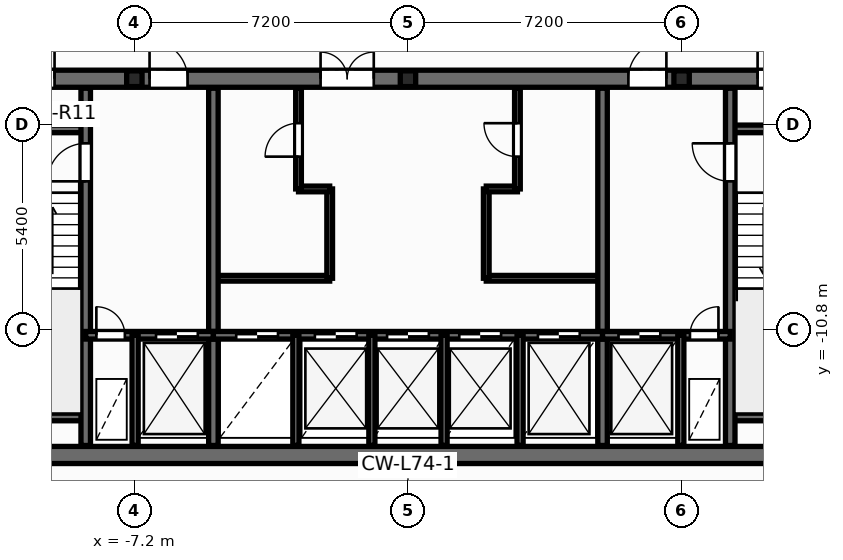
"""IFC4 building model, lengths in metres.
Left out: names, types, materials, properties, quantities, classifications, styles, units other than length and angle.
Written with IfcOpenShell. Run it as: python <this file> out.ifc"""

import sys

from ifc_helpers import new_model, si_unit, direction, frame, frame_2d, origin, origin_2d, place, context, subcontext, project, spatial, rectangle, i_section, extrude, element, fill, save


model = new_model("IFC4")
c1 = context("Model", 3, precision=1e-05, world=origin(), true_north=direction((0.0, 1.0)))
c2 = subcontext(c1, "Body", "Model", "MODEL_VIEW")
j1 = project(units=[si_unit("LENGTHUNIT", "METRE"), si_unit("PLANEANGLEUNIT", "RADIAN")], contexts=[c1])
p1 = place(None, origin())
s1 = spatial("IfcSite", under=j1, at=p1, CompositionType="ELEMENT")
p2 = place(p1, origin())
s2 = spatial("IfcBuilding", under=s1, at=p2, CompositionType="ELEMENT")
p3 = place(p2, frame((0.0, 0.0, 281.4)))
s3 = spatial("IfcBuildingStorey", under=s2, at=p3, CompositionType="ELEMENT", Elevation=281.4)
for number, where, z_axis, x_axis in (
    (1, (-7.2, -4.2, 0.0), (0.0, 0.0, 1.0), (1.0, 0.0, 0.0)),
    (2, (0.0, -4.2, 0.0), (0.0, 0.0, 1.0), (1.0, 0.0, 0.0)),
    (3, (7.2, -4.2, 0.0), (0.0, 0.0, 1.0), (1.0, 0.0, 0.0)),
):
    element("IfcColumn", number, at=place(p3, frame(where, z_axis=z_axis, x_axis=x_axis)), inside=s3, PredefinedType="PILASTER", context=c2, shape_type="SweptSolid", body=[
        extrude(i_section(OverallWidth=0.405, OverallDepth=0.414, WebThickness=0.022, FlangeThickness=0.032, at=origin_2d()), origin(), (0.0, 0.0, 1.0), 3.6),
    ])
p4 = place(p3, frame((-5.12, -9.45, 0.0), z_axis=(0.0, 0.0, 1.0), x_axis=(1.0, 0.0, 0.0)))
e4 = element("IfcWall", 4, at=p4, inside=s3, PredefinedType="PARTITIONING", context=c2, shape_type="SweptSolid", body=[
    extrude(rectangle(XDim=3.06, YDim=0.15, at=frame_2d((1.53, 0.0))), origin(), (0.0, 0.0, 1.0), 3.32),
])
p5 = place(p3, frame((-2.06, -9.45, 0.0), z_axis=(0.0, 0.0, 1.0), x_axis=(0.0, 1.0, 0.0)))
e5 = element("IfcWall", 5, at=p5, inside=s3, PredefinedType="PARTITIONING", context=c2, shape_type="SweptSolid", body=[
    extrude(rectangle(XDim=2.35, YDim=0.15, at=frame_2d((1.175, 0.0))), origin(), (0.0, 0.0, 1.0), 3.32),
])
p6 = place(p3, frame((-2.88, -7.1, 0.0), z_axis=(0.0, 0.0, 1.0), x_axis=(1.0, 0.0, 0.0)))
e6 = element("IfcWall", 6, at=p6, inside=s3, PredefinedType="PARTITIONING", context=c2, shape_type="SweptSolid", body=[
    extrude(rectangle(XDim=0.82, YDim=0.15, at=frame_2d((0.41, 0.0))), origin(), (0.0, 0.0, 1.0), 3.32),
])
p7 = place(p3, frame((-2.88, -7.1, 0.0), z_axis=(0.0, 0.0, 1.0), x_axis=(0.0, 1.0, 0.0)))
e7 = element("IfcWall", 7, at=p7, inside=s3, PredefinedType="PARTITIONING", context=c2, shape_type="SweptSolid", body=[
    extrude(rectangle(XDim=2.65, YDim=0.15, at=frame_2d((1.325, 0.0))), origin(), (0.0, 0.0, 1.0), 3.32),
])
p8 = place(p7, frame((0.85, 0.0, 0.0)))
e8 = element("IfcOpeningElement", 8, at=p8, cuts=e7, PredefinedType="OPENING", context=c2, shape_type="SweptSolid", body=[
    extrude(rectangle(XDim=0.886, YDim=2.104, at=frame_2d((0.44, 1.052))), frame((0.0, 0.085, 0.0), z_axis=(0.0, -1.0, 0.0), x_axis=(1.0, 0.0, 0.0)), (0.0, 0.0, 1.0), 0.17),
])
p9 = place(p3, frame((2.06, -9.45, 0.0), z_axis=(0.0, 0.0, 1.0), x_axis=(1.0, 0.0, 0.0)))
e9 = element("IfcWall", 9, at=p9, inside=s3, PredefinedType="PARTITIONING", context=c2, shape_type="SweptSolid", body=[
    extrude(rectangle(XDim=3.06, YDim=0.15, at=frame_2d((1.53, 0.0))), origin(), (0.0, 0.0, 1.0), 3.32),
])
p10 = place(p3, frame((2.06, -9.45, 0.0), z_axis=(0.0, 0.0, 1.0), x_axis=(0.0, 1.0, 0.0)))
e10 = element("IfcWall", 10, at=p10, inside=s3, PredefinedType="PARTITIONING", context=c2, shape_type="SweptSolid", body=[
    extrude(rectangle(XDim=2.35, YDim=0.15, at=frame_2d((1.175, 0.0))), origin(), (0.0, 0.0, 1.0), 3.32),
])
p11 = place(p3, frame((2.06, -7.1, 0.0), z_axis=(0.0, 0.0, 1.0), x_axis=(1.0, 0.0, 0.0)))
e11 = element("IfcWall", 11, at=p11, inside=s3, PredefinedType="PARTITIONING", context=c2, shape_type="SweptSolid", body=[
    extrude(rectangle(XDim=0.82, YDim=0.15, at=frame_2d((0.41, 0.0))), origin(), (0.0, 0.0, 1.0), 3.32),
])
p12 = place(p3, frame((2.88, -7.1, 0.0), z_axis=(0.0, 0.0, 1.0), x_axis=(0.0, 1.0, 0.0)))
e12 = element("IfcWall", 12, at=p12, inside=s3, PredefinedType="PARTITIONING", context=c2, shape_type="SweptSolid", body=[
    extrude(rectangle(XDim=2.65, YDim=0.15, at=frame_2d((1.325, 0.0))), origin(), (0.0, 0.0, 1.0), 3.32),
])
p13 = place(p12, frame((0.85, 0.0, 0.0)))
e13 = element("IfcOpeningElement", 13, at=p13, cuts=e12, PredefinedType="OPENING", context=c2, shape_type="SweptSolid", body=[
    extrude(rectangle(XDim=0.886, YDim=2.104, at=frame_2d((0.44, 1.052))), frame((0.0, 0.085, 0.0), z_axis=(0.0, -1.0, 0.0), x_axis=(1.0, 0.0, 0.0)), (0.0, 0.0, 1.0), 0.17),
])
p14 = place(p3, frame((-12.65, -14.1, 0.0), z_axis=(0.0, 0.0, 1.0), x_axis=(1.0, 0.0, 0.0)))
e14 = element("IfcWall", 14, at=p14, inside=s3, PredefinedType="SHEAR", context=c2, shape_type="SweptSolid", body=[
    extrude(rectangle(XDim=25.3, YDim=0.45, at=frame_2d((12.65, 0.0))), origin(), (0.0, 0.0, 1.0), 3.6),
])
p15 = place(p3, frame((-12.65, -4.2, 0.0), z_axis=(0.0, 0.0, 1.0), x_axis=(1.0, 0.0, 0.0)))
e15 = element("IfcWall", 15, at=p15, inside=s3, PredefinedType="SHEAR", context=c2, shape_type="SweptSolid", body=[
    extrude(rectangle(XDim=25.3, YDim=0.45, at=frame_2d((12.65, 0.0))), origin(), (0.0, 0.0, 1.0), 3.6),
])
p16 = place(p15, frame((0.95, 0.0, 0.0)))
e16 = element("IfcOpeningElement", 16, at=p16, cuts=e15, PredefinedType="OPENING", context=c2, shape_type="SweptSolid", body=[
    extrude(rectangle(XDim=0.756, YDim=2.054, at=frame_2d((0.375, 1.027))), frame((0.0, 0.235, 0.0), z_axis=(0.0, -1.0, 0.0), x_axis=(1.0, 0.0, 0.0)), (0.0, 0.0, 1.0), 0.47),
])
p17 = place(p15, frame((2.6, 0.0, 0.0)))
e17 = element("IfcOpeningElement", 17, at=p17, cuts=e15, PredefinedType="OPENING", context=c2, shape_type="SweptSolid", body=[
    extrude(rectangle(XDim=0.756, YDim=2.054, at=frame_2d((0.375, 1.027))), frame((0.0, 0.235, 0.0), z_axis=(0.0, -1.0, 0.0), x_axis=(1.0, 0.0, 0.0)), (0.0, 0.0, 1.0), 0.47),
])
p18 = place(p15, frame((21.85, 0.0, 0.0)))
e18 = element("IfcOpeningElement", 18, at=p18, cuts=e15, PredefinedType="OPENING", context=c2, shape_type="SweptSolid", body=[
    extrude(rectangle(XDim=0.756, YDim=2.054, at=frame_2d((0.375, 1.027))), frame((0.0, 0.235, 0.0), z_axis=(0.0, -1.0, 0.0), x_axis=(1.0, 0.0, 0.0)), (0.0, 0.0, 1.0), 0.47),
])
p19 = place(p15, frame((23.5, 0.0, 0.0)))
e19 = element("IfcOpeningElement", 19, at=p19, cuts=e15, PredefinedType="OPENING", context=c2, shape_type="SweptSolid", body=[
    extrude(rectangle(XDim=0.756, YDim=2.054, at=frame_2d((0.375, 1.027))), frame((0.0, 0.235, 0.0), z_axis=(0.0, -1.0, 0.0), x_axis=(1.0, 0.0, 0.0)), (0.0, 0.0, 1.0), 0.47),
])
p20 = place(p15, frame((5.85, 0.0, 0.0)))
e20 = element("IfcOpeningElement", 20, at=p20, cuts=e15, PredefinedType="OPENING", context=c2, shape_type="SweptSolid", body=[
    extrude(rectangle(XDim=1.006, YDim=2.104, at=frame_2d((0.5, 1.052))), frame((0.0, 0.235, 0.0), z_axis=(0.0, -1.0, 0.0), x_axis=(1.0, 0.0, 0.0)), (0.0, 0.0, 1.0), 0.47),
])
p21 = place(p15, frame((10.35, 0.0, 0.0)))
e21 = element("IfcOpeningElement", 21, at=p21, cuts=e15, PredefinedType="OPENING", context=c2, shape_type="SweptSolid", body=[
    extrude(rectangle(XDim=1.406, YDim=2.154, at=frame_2d((0.7, 1.077))), frame((0.0, 0.235, 0.0), z_axis=(0.0, -1.0, 0.0), x_axis=(1.0, 0.0, 0.0)), (0.0, 0.0, 1.0), 0.47),
])
p22 = place(p15, frame((18.45, 0.0, 0.0)))
e22 = element("IfcOpeningElement", 22, at=p22, cuts=e15, PredefinedType="OPENING", context=c2, shape_type="SweptSolid", body=[
    extrude(rectangle(XDim=1.006, YDim=2.104, at=frame_2d((0.5, 1.052))), frame((0.0, 0.235, 0.0), z_axis=(0.0, -1.0, 0.0), x_axis=(1.0, 0.0, 0.0)), (0.0, 0.0, 1.0), 0.47),
])
for number, where, z_axis, x_axis in (
    (23, (-12.35, -5.52, 0.0), (0.0, 0.0, 1.0), (1.0, 0.0, 0.0)),
    (24, (-12.35, -13.1, 0.0), (0.0, 0.0, 1.0), (1.0, 0.0, 0.0)),
    (25, (8.48, -5.52, 0.0), (0.0, 0.0, 1.0), (1.0, 0.0, 0.0)),
    (26, (8.48, -13.1, 0.0), (0.0, 0.0, 1.0), (1.0, 0.0, 0.0)),
):
    element("IfcWall", number, at=place(p3, frame(where, z_axis=z_axis, x_axis=x_axis)), inside=s3, PredefinedType="SOLIDWALL", context=c2, shape_type="SweptSolid", body=[
        extrude(rectangle(XDim=3.87, YDim=0.2, at=frame_2d((1.935, 0.0))), origin(), (0.0, 0.0, 1.0), 3.6),
    ])
p23 = place(p3, frame((-8.48, -13.85, 0.0), z_axis=(0.0, 0.0, 1.0), x_axis=(0.0, 1.0, 0.0)))
e27 = element("IfcWall", 27, at=p23, inside=s3, PredefinedType="SHEAR", context=c2, shape_type="SweptSolid", body=[
    extrude(rectangle(XDim=9.4, YDim=0.25, at=frame_2d((4.7, 0.0))), origin(), (0.0, 0.0, 1.0), 3.6),
])
p24 = place(p23, frame((6.95, 0.0, 0.0)))
e28 = element("IfcOpeningElement", 28, at=p24, cuts=e27, PredefinedType="OPENING", context=c2, shape_type="SweptSolid", body=[
    extrude(rectangle(XDim=1.006, YDim=2.104, at=frame_2d((0.5, 1.052))), frame((0.0, 0.135, 0.0), z_axis=(0.0, -1.0, 0.0), x_axis=(1.0, 0.0, 0.0)), (0.0, 0.0, 1.0), 0.27),
])
p25 = place(p3, frame((8.48, -13.85, 0.0), z_axis=(0.0, 0.0, 1.0), x_axis=(0.0, 1.0, 0.0)))
e29 = element("IfcWall", 29, at=p25, inside=s3, PredefinedType="SHEAR", context=c2, shape_type="SweptSolid", body=[
    extrude(rectangle(XDim=9.4, YDim=0.25, at=frame_2d((4.7, 0.0))), origin(), (0.0, 0.0, 1.0), 3.6),
])
p26 = place(p25, frame((6.95, 0.0, 0.0)))
e30 = element("IfcOpeningElement", 30, at=p26, cuts=e29, PredefinedType="OPENING", context=c2, shape_type="SweptSolid", body=[
    extrude(rectangle(XDim=1.006, YDim=2.104, at=frame_2d((0.5, 1.052))), frame((0.0, 0.135, 0.0), z_axis=(0.0, -1.0, 0.0), x_axis=(1.0, 0.0, 0.0)), (0.0, 0.0, 1.0), 0.27),
])
for number, where, z_axis, x_axis in (
    (31, (-5.12, -13.85, 0.0), (0.0, 0.0, 1.0), (0.0, 1.0, 0.0)),
    (32, (5.12, -13.85, 0.0), (0.0, 0.0, 1.0), (0.0, 1.0, 0.0)),
):
    element("IfcWall", number, at=place(p3, frame(where, z_axis=z_axis, x_axis=x_axis)), inside=s3, PredefinedType="SHEAR", context=c2, shape_type="SweptSolid", body=[
        extrude(rectangle(XDim=9.4, YDim=0.25, at=frame_2d((4.7, 0.0))), origin(), (0.0, 0.0, 1.0), 3.6),
    ])
p27 = place(p3, frame((-8.48, -10.95, 0.0), z_axis=(0.0, 0.0, 1.0), x_axis=(1.0, 0.0, 0.0)))
e33 = element("IfcWall", 33, at=p27, inside=s3, PredefinedType="SOLIDWALL", context=c2, shape_type="SweptSolid", body=[
    extrude(rectangle(XDim=3.36, YDim=0.2, at=frame_2d((1.68, 0.0))), origin(), (0.0, 0.0, 1.0), 3.6),
])
p28 = place(p27, frame((0.28, 0.0, 0.0)))
e34 = element("IfcOpeningElement", 34, at=p28, cuts=e33, PredefinedType="OPENING", context=c2, shape_type="SweptSolid", body=[
    extrude(rectangle(XDim=0.756, YDim=2.054, at=frame_2d((0.375, 1.027))), frame((0.0, 0.11, 0.0), z_axis=(0.0, -1.0, 0.0), x_axis=(1.0, 0.0, 0.0)), (0.0, 0.0, 1.0), 0.22),
])
p29 = place(p27, frame((1.85, 0.0, 0.0)))
e35 = element("IfcOpeningElement", 35, at=p29, cuts=e33, PredefinedType="OPENING", context=c2, shape_type="SweptSolid", body=[
    extrude(rectangle(XDim=1.106, YDim=2.104, at=frame_2d((0.55, 1.052))), frame((0.0, 0.11, 0.0), z_axis=(0.0, -1.0, 0.0), x_axis=(1.0, 0.0, 0.0)), (0.0, 0.0, 1.0), 0.22),
])
p30 = place(p3, frame((-5.12, -10.95, 0.0), z_axis=(0.0, 0.0, 1.0), x_axis=(1.0, 0.0, 0.0)))
e36 = element("IfcWall", 36, at=p30, inside=s3, PredefinedType="SOLIDWALL", context=c2, shape_type="SweptSolid", body=[
    extrude(rectangle(XDim=10.24, YDim=0.2, at=frame_2d((5.12, 0.0))), origin(), (0.0, 0.0, 1.0), 3.6),
])
p31 = place(p30, frame((0.6, 0.0, 0.0)))
e37 = element("IfcOpeningElement", 37, at=p31, cuts=e36, PredefinedType="OPENING", context=c2, shape_type="SweptSolid", body=[
    extrude(rectangle(XDim=1.106, YDim=2.104, at=frame_2d((0.55, 1.052))), frame((0.0, 0.11, 0.0), z_axis=(0.0, -1.0, 0.0), x_axis=(1.0, 0.0, 0.0)), (0.0, 0.0, 1.0), 0.22),
])
p32 = place(p30, frame((2.67, 0.0, 0.0)))
e38 = element("IfcOpeningElement", 38, at=p32, cuts=e36, PredefinedType="OPENING", context=c2, shape_type="SweptSolid", body=[
    extrude(rectangle(XDim=1.106, YDim=2.104, at=frame_2d((0.55, 1.052))), frame((0.0, 0.11, 0.0), z_axis=(0.0, -1.0, 0.0), x_axis=(1.0, 0.0, 0.0)), (0.0, 0.0, 1.0), 0.22),
])
p33 = place(p30, frame((4.57, 0.0, 0.0)))
e39 = element("IfcOpeningElement", 39, at=p33, cuts=e36, PredefinedType="OPENING", context=c2, shape_type="SweptSolid", body=[
    extrude(rectangle(XDim=1.106, YDim=2.104, at=frame_2d((0.55, 1.052))), frame((0.0, 0.11, 0.0), z_axis=(0.0, -1.0, 0.0), x_axis=(1.0, 0.0, 0.0)), (0.0, 0.0, 1.0), 0.22),
])
p34 = place(p30, frame((6.47, 0.0, 0.0)))
e40 = element("IfcOpeningElement", 40, at=p34, cuts=e36, PredefinedType="OPENING", context=c2, shape_type="SweptSolid", body=[
    extrude(rectangle(XDim=1.106, YDim=2.104, at=frame_2d((0.55, 1.052))), frame((0.0, 0.11, 0.0), z_axis=(0.0, -1.0, 0.0), x_axis=(1.0, 0.0, 0.0)), (0.0, 0.0, 1.0), 0.22),
])
p35 = place(p30, frame((8.54, 0.0, 0.0)))
e41 = element("IfcOpeningElement", 41, at=p35, cuts=e36, PredefinedType="OPENING", context=c2, shape_type="SweptSolid", body=[
    extrude(rectangle(XDim=1.106, YDim=2.104, at=frame_2d((0.55, 1.052))), frame((0.0, 0.11, 0.0), z_axis=(0.0, -1.0, 0.0), x_axis=(1.0, 0.0, 0.0)), (0.0, 0.0, 1.0), 0.22),
])
p36 = place(p3, frame((5.12, -10.95, 0.0), z_axis=(0.0, 0.0, 1.0), x_axis=(1.0, 0.0, 0.0)))
e42 = element("IfcWall", 42, at=p36, inside=s3, PredefinedType="SOLIDWALL", context=c2, shape_type="SweptSolid", body=[
    extrude(rectangle(XDim=3.36, YDim=0.2, at=frame_2d((1.68, 0.0))), origin(), (0.0, 0.0, 1.0), 3.6),
])
p37 = place(p36, frame((0.42, 0.0, 0.0)))
e43 = element("IfcOpeningElement", 43, at=p37, cuts=e42, PredefinedType="OPENING", context=c2, shape_type="SweptSolid", body=[
    extrude(rectangle(XDim=1.106, YDim=2.104, at=frame_2d((0.55, 1.052))), frame((0.0, 0.11, 0.0), z_axis=(0.0, -1.0, 0.0), x_axis=(1.0, 0.0, 0.0)), (0.0, 0.0, 1.0), 0.22),
])
p38 = place(p36, frame((2.3, 0.0, 0.0)))
e44 = element("IfcOpeningElement", 44, at=p38, cuts=e42, PredefinedType="OPENING", context=c2, shape_type="SweptSolid", body=[
    extrude(rectangle(XDim=0.756, YDim=2.054, at=frame_2d((0.375, 1.027))), frame((0.0, 0.11, 0.0), z_axis=(0.0, -1.0, 0.0), x_axis=(1.0, 0.0, 0.0)), (0.0, 0.0, 1.0), 0.22),
])
for number, where, z_axis, x_axis in (
    (45, (-7.18, -13.85, 0.0), (0.0, 0.0, 1.0), (0.0, 1.0, 0.0)),
    (46, (7.18, -13.85, 0.0), (0.0, 0.0, 1.0), (0.0, 1.0, 0.0)),
    (47, (-2.95, -13.85, 0.0), (0.0, 0.0, 1.0), (0.0, 1.0, 0.0)),
    (48, (2.95, -13.85, 0.0), (0.0, 0.0, 1.0), (0.0, 1.0, 0.0)),
    (49, (-0.95, -13.85, 0.0), (0.0, 0.0, 1.0), (0.0, 1.0, 0.0)),
    (50, (0.95, -13.85, 0.0), (0.0, 0.0, 1.0), (0.0, 1.0, 0.0)),
):
    element("IfcWall", number, at=place(p3, frame(where, z_axis=z_axis, x_axis=x_axis)), inside=s3, PredefinedType="PARTITIONING", context=c2, shape_type="SweptSolid", body=[
        extrude(rectangle(XDim=2.9, YDim=0.16, at=frame_2d((1.45, 0.0))), origin(), (0.0, 0.0, 1.0), 2.545),
    ])
p39 = place(p8, origin())
e51 = element("IfcDoor", 51, at=p39, inside=s3, OperationType="SINGLE_SWING_LEFT", PredefinedType="DOOR", context=c2, shape_type="SweptSolid", body=[
    extrude(rectangle(XDim=0.88, YDim=2.1, at=frame_2d((0.44, 1.05))), frame((0.0, 0.025, 0.0), z_axis=(0.0, -1.0, 0.0), x_axis=(1.0, 0.0, 0.0)), (0.0, 0.0, 1.0), 0.05),
])
fill(e8, e51)
p40 = place(p13, origin())
e52 = element("IfcDoor", 52, at=p40, inside=s3, OperationType="SINGLE_SWING_RIGHT", PredefinedType="DOOR", context=c2, shape_type="SweptSolid", body=[
    extrude(rectangle(XDim=0.88, YDim=2.1, at=frame_2d((0.44, 1.05))), frame((0.0, 0.025, 0.0), z_axis=(0.0, -1.0, 0.0), x_axis=(1.0, 0.0, 0.0)), (0.0, 0.0, 1.0), 0.05),
])
fill(e13, e52)
p41 = place(p24, origin())
e53 = element("IfcDoor", 53, at=p41, inside=s3, OperationType="SINGLE_SWING_LEFT", PredefinedType="DOOR", context=c2, shape_type="SweptSolid", body=[
    extrude(rectangle(XDim=1.0, YDim=2.1, at=frame_2d((0.5, 1.05))), frame((0.0, 0.025, 0.0), z_axis=(0.0, -1.0, 0.0), x_axis=(1.0, 0.0, 0.0)), (0.0, 0.0, 1.0), 0.05),
])
fill(e28, e53)
p42 = place(p26, origin())
e54 = element("IfcDoor", 54, at=p42, inside=s3, OperationType="SINGLE_SWING_RIGHT", PredefinedType="DOOR", context=c2, shape_type="SweptSolid", body=[
    extrude(rectangle(XDim=1.0, YDim=2.1, at=frame_2d((0.5, 1.05))), frame((0.0, 0.025, 0.0), z_axis=(0.0, -1.0, 0.0), x_axis=(1.0, 0.0, 0.0)), (0.0, 0.0, 1.0), 0.05),
])
fill(e30, e54)
p43 = place(p28, origin())
e55 = element("IfcDoor", 55, at=p43, inside=s3, OperationType="SINGLE_SWING_LEFT", PredefinedType="DOOR", context=c2, shape_type="SweptSolid", body=[
    extrude(rectangle(XDim=0.75, YDim=2.05, at=frame_2d((0.375, 1.025))), frame((0.0, 0.025, 0.0), z_axis=(0.0, -1.0, 0.0), x_axis=(1.0, 0.0, 0.0)), (0.0, 0.0, 1.0), 0.05),
])
fill(e34, e55)
p44 = place(p29, origin())
e56 = element("IfcDoor", 56, at=p44, inside=s3, OperationType="DOUBLE_DOOR_SLIDING", PredefinedType="DOOR", context=c2, shape_type="SweptSolid", body=[
    extrude(rectangle(XDim=1.1, YDim=2.1, at=frame_2d((0.55, 1.05))), frame((0.0, 0.025, 0.0), z_axis=(0.0, -1.0, 0.0), x_axis=(1.0, 0.0, 0.0)), (0.0, 0.0, 1.0), 0.05),
])
fill(e35, e56)
p45 = place(p37, origin())
e57 = element("IfcDoor", 57, at=p45, inside=s3, OperationType="DOUBLE_DOOR_SLIDING", PredefinedType="DOOR", context=c2, shape_type="SweptSolid", body=[
    extrude(rectangle(XDim=1.1, YDim=2.1, at=frame_2d((0.55, 1.05))), frame((0.0, 0.025, 0.0), z_axis=(0.0, -1.0, 0.0), x_axis=(1.0, 0.0, 0.0)), (0.0, 0.0, 1.0), 0.05),
])
fill(e43, e57)
p46 = place(p38, origin())
e58 = element("IfcDoor", 58, at=p46, inside=s3, OperationType="SINGLE_SWING_RIGHT", PredefinedType="DOOR", context=c2, shape_type="SweptSolid", body=[
    extrude(rectangle(XDim=0.75, YDim=2.05, at=frame_2d((0.375, 1.025))), frame((0.0, 0.025, 0.0), z_axis=(0.0, -1.0, 0.0), x_axis=(1.0, 0.0, 0.0)), (0.0, 0.0, 1.0), 0.05),
])
fill(e44, e58)
p47 = place(p31, origin())
e59 = element("IfcDoor", 59, at=p47, inside=s3, OperationType="DOUBLE_DOOR_SLIDING", PredefinedType="DOOR", context=c2, shape_type="SweptSolid", body=[
    extrude(rectangle(XDim=1.1, YDim=2.1, at=frame_2d((0.55, 1.05))), frame((0.0, 0.025, 0.0), z_axis=(0.0, -1.0, 0.0), x_axis=(1.0, 0.0, 0.0)), (0.0, 0.0, 1.0), 0.05),
])
fill(e37, e59)
p48 = place(p32, origin())
e60 = element("IfcDoor", 60, at=p48, inside=s3, OperationType="DOUBLE_DOOR_SLIDING", PredefinedType="DOOR", context=c2, shape_type="SweptSolid", body=[
    extrude(rectangle(XDim=1.1, YDim=2.1, at=frame_2d((0.55, 1.05))), frame((0.0, 0.025, 0.0), z_axis=(0.0, -1.0, 0.0), x_axis=(1.0, 0.0, 0.0)), (0.0, 0.0, 1.0), 0.05),
])
fill(e38, e60)
p49 = place(p33, origin())
e61 = element("IfcDoor", 61, at=p49, inside=s3, OperationType="DOUBLE_DOOR_SLIDING", PredefinedType="DOOR", context=c2, shape_type="SweptSolid", body=[
    extrude(rectangle(XDim=1.1, YDim=2.1, at=frame_2d((0.55, 1.05))), frame((0.0, 0.025, 0.0), z_axis=(0.0, -1.0, 0.0), x_axis=(1.0, 0.0, 0.0)), (0.0, 0.0, 1.0), 0.05),
])
fill(e39, e61)
p50 = place(p34, origin())
e62 = element("IfcDoor", 62, at=p50, inside=s3, OperationType="DOUBLE_DOOR_SLIDING", PredefinedType="DOOR", context=c2, shape_type="SweptSolid", body=[
    extrude(rectangle(XDim=1.1, YDim=2.1, at=frame_2d((0.55, 1.05))), frame((0.0, 0.025, 0.0), z_axis=(0.0, -1.0, 0.0), x_axis=(1.0, 0.0, 0.0)), (0.0, 0.0, 1.0), 0.05),
])
fill(e40, e62)
p51 = place(p35, origin())
e63 = element("IfcDoor", 63, at=p51, inside=s3, OperationType="DOUBLE_DOOR_SLIDING", PredefinedType="DOOR", context=c2, shape_type="SweptSolid", body=[
    extrude(rectangle(XDim=1.1, YDim=2.1, at=frame_2d((0.55, 1.05))), frame((0.0, 0.025, 0.0), z_axis=(0.0, -1.0, 0.0), x_axis=(1.0, 0.0, 0.0)), (0.0, 0.0, 1.0), 0.05),
])
fill(e41, e63)
p52 = place(p17, origin())
e64 = element("IfcDoor", 64, at=p52, inside=s3, OperationType="SINGLE_SWING_RIGHT", PredefinedType="DOOR", context=c2, shape_type="SweptSolid", body=[
    extrude(rectangle(XDim=0.75, YDim=2.05, at=frame_2d((0.375, 1.025))), frame((0.0, 0.025, 0.0), z_axis=(0.0, -1.0, 0.0), x_axis=(1.0, 0.0, 0.0)), (0.0, 0.0, 1.0), 0.05),
])
fill(e17, e64)
p53 = place(p18, origin())
e65 = element("IfcDoor", 65, at=p53, inside=s3, OperationType="SINGLE_SWING_LEFT", PredefinedType="DOOR", context=c2, shape_type="SweptSolid", body=[
    extrude(rectangle(XDim=0.75, YDim=2.05, at=frame_2d((0.375, 1.025))), frame((0.0, 0.025, 0.0), z_axis=(0.0, -1.0, 0.0), x_axis=(1.0, 0.0, 0.0)), (0.0, 0.0, 1.0), 0.05),
])
fill(e18, e65)
p54 = place(p20, origin())
e66 = element("IfcDoor", 66, at=p54, inside=s3, OperationType="SINGLE_SWING_LEFT", PredefinedType="DOOR", context=c2, shape_type="SweptSolid", body=[
    extrude(rectangle(XDim=1.0, YDim=2.1, at=frame_2d((0.5, 1.05))), frame((0.0, 0.025, 0.0), z_axis=(0.0, -1.0, 0.0), x_axis=(1.0, 0.0, 0.0)), (0.0, 0.0, 1.0), 0.05),
])
fill(e20, e66)
p55 = place(p21, origin())
e67 = element("IfcDoor", 67, at=p55, inside=s3, OperationType="DOUBLE_DOOR_SINGLE_SWING", PredefinedType="DOOR", context=c2, shape_type="SweptSolid", body=[
    extrude(rectangle(XDim=1.4, YDim=2.15, at=frame_2d((0.7, 1.075))), frame((0.0, 0.025, 0.0), z_axis=(0.0, -1.0, 0.0), x_axis=(1.0, 0.0, 0.0)), (0.0, 0.0, 1.0), 0.05),
])
fill(e21, e67)
p56 = place(p22, origin())
e68 = element("IfcDoor", 68, at=p56, inside=s3, OperationType="SINGLE_SWING_RIGHT", PredefinedType="DOOR", context=c2, shape_type="SweptSolid", body=[
    extrude(rectangle(XDim=1.0, YDim=2.1, at=frame_2d((0.5, 1.05))), frame((0.0, 0.025, 0.0), z_axis=(0.0, -1.0, 0.0), x_axis=(1.0, 0.0, 0.0)), (0.0, 0.0, 1.0), 0.05),
])
fill(e22, e68)
save(model, sys.argv[1])
